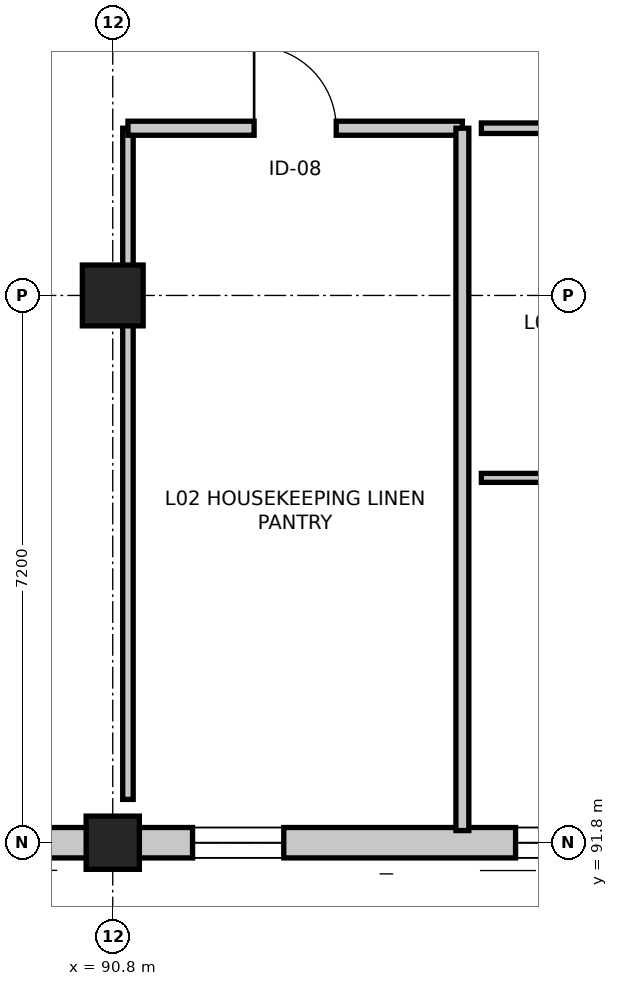
"""IFC4 building model, lengths in metres.
Left out: names, types, materials, properties, quantities, classifications, styles, units other than length and angle.
Written with IfcOpenShell. Run it as: python <this file> out.ifc"""

import sys

from ifc_helpers import new_model, si_unit, direction, frame, frame_2d, origin, origin_2d, place, context, subcontext, project, spatial, rectangle, extrude, element, fill, save


model = new_model("IFC4")
c1 = context("Model", 3, precision=1e-05, world=origin(), true_north=direction((0.0, 1.0)))
c2 = subcontext(c1, "Body", "Model", "MODEL_VIEW")
j1 = project(units=[si_unit("LENGTHUNIT", "METRE"), si_unit("PLANEANGLEUNIT", "RADIAN")], contexts=[c1])
p1 = place(None, origin())
s1 = spatial("IfcSite", under=j1, at=p1, CompositionType="ELEMENT")
p2 = place(p1, origin())
s2 = spatial("IfcBuilding", under=s1, at=p2, CompositionType="ELEMENT")
p3 = place(p2, frame((0.0, 0.0, 10.5)))
s3 = spatial("IfcBuildingStorey", under=s2, at=p3, CompositionType="ELEMENT", Elevation=10.5)
p4 = place(p3, frame((90.8, 91.8, 0.0), z_axis=(0.0, 0.0, 1.0), x_axis=(1.0, 0.0, 0.0)))
e1 = element("IfcColumn", 1, at=p4, inside=s3, PredefinedType="COLUMN", context=c2, shape_type="SweptSolid", body=[
    extrude(rectangle(XDim=0.7, YDim=0.7, at=origin_2d()), origin(), (0.0, 0.0, 1.0), 4.5),
])
p5 = place(p3, frame((90.8, 99.0, 0.0), z_axis=(0.0, 0.0, 1.0), x_axis=(1.0, 0.0, 0.0)))
e2 = element("IfcColumn", 2, at=p5, inside=s3, PredefinedType="COLUMN", context=c2, shape_type="SweptSolid", body=[
    extrude(rectangle(XDim=0.8, YDim=0.8, at=origin_2d()), origin(), (0.0, 0.0, 1.0), 4.5),
])
p6 = place(p3, frame((98.0, 91.8, 0.0), z_axis=(0.0, 0.0, 1.0), x_axis=(-1.0, 0.0, 0.0)))
e3 = element("IfcWall", 3, at=p6, inside=s3, PredefinedType="STANDARD", context=c2, shape_type="SweptSolid", body=[
    extrude(rectangle(XDim=7.2, YDim=0.4, at=frame_2d((3.6, 0.0))), origin(), (0.0, 0.0, 1.0), 3.455),
])
p7 = place(p6, frame((0.7, 0.0, 0.9)))
e4 = element("IfcOpeningElement", 4, at=p7, cuts=e3, PredefinedType="OPENING", context=c2, shape_type="SweptSolid", body=[
    extrude(rectangle(XDim=1.2, YDim=1.8, at=frame_2d((0.6, 0.9))), frame((0.0, 0.21, 0.0), z_axis=(0.0, -1.0, 0.0), x_axis=(1.0, 0.0, 0.0)), (0.0, 0.0, 1.0), 0.42),
])
p8 = place(p6, frame((4.95, 0.0, 0.85)))
e5 = element("IfcOpeningElement", 5, at=p8, cuts=e3, PredefinedType="OPENING", context=c2, shape_type="SweptSolid", body=[
    extrude(rectangle(XDim=1.2, YDim=1.8, at=frame_2d((0.6, 0.9))), frame((0.0, 0.21, 0.0), z_axis=(0.0, -1.0, 0.0), x_axis=(1.0, 0.0, 0.0)), (0.0, 0.0, 1.0), 0.42),
])
p9 = place(p3, frame((90.8, 91.8, 0.0), z_axis=(0.0, 0.0, 1.0), x_axis=(-1.0, 0.0, 0.0)))
e6 = element("IfcWall", 6, at=p9, inside=s3, PredefinedType="STANDARD", context=c2, shape_type="SweptSolid", body=[
    extrude(rectangle(XDim=7.2, YDim=0.4, at=frame_2d((3.6, 0.0))), origin(), (0.0, 0.0, 1.0), 3.455),
])
p10 = place(p9, frame((2.525, 0.0, 0.9)))
e7 = element("IfcOpeningElement", 7, at=p10, cuts=e6, PredefinedType="OPENING", context=c2, shape_type="SweptSolid", body=[
    extrude(rectangle(XDim=2.15, YDim=2.2, at=frame_2d((1.075, 1.1))), frame((0.0, 0.21, 0.0), z_axis=(0.0, -1.0, 0.0), x_axis=(1.0, 0.0, 0.0)), (0.0, 0.0, 1.0), 0.42),
])
p11 = place(p9, frame((4.95, 0.0, 0.85)))
e8 = element("IfcOpeningElement", 8, at=p11, cuts=e6, PredefinedType="OPENING", context=c2, shape_type="SweptSolid", body=[
    extrude(rectangle(XDim=1.2, YDim=1.8, at=frame_2d((0.6, 0.9))), frame((0.0, 0.21, 0.0), z_axis=(0.0, -1.0, 0.0), x_axis=(1.0, 0.0, 0.0)), (0.0, 0.0, 1.0), 0.42),
])
p12 = place(p3, frame((91.0, 92.37, 0.0), z_axis=(0.0, 0.0, 1.0), x_axis=(0.0, 1.0, 0.0)))
e9 = element("IfcWall", 9, at=p12, inside=s3, PredefinedType="PARTITIONING", context=c2, shape_type="SweptSolid", body=[
    extrude(rectangle(XDim=8.83, YDim=0.138, at=frame_2d((4.415, 0.0))), origin(), (0.0, 0.0, 1.0), 3.555),
])
p13 = place(p3, frame((91.0, 101.2, 0.0), z_axis=(0.0, 0.0, 1.0), x_axis=(1.0, 0.0, 0.0)))
e10 = element("IfcWall", 10, at=p13, inside=s3, PredefinedType="PARTITIONING", context=c2, shape_type="SweptSolid", body=[
    extrude(rectangle(XDim=4.4, YDim=0.185, at=frame_2d((2.2, 0.0))), origin(), (0.0, 0.0, 1.0), 3.555),
])
p14 = place(p13, frame((1.66, 0.0, 0.0)))
e11 = element("IfcOpeningElement", 11, at=p14, cuts=e10, PredefinedType="OPENING", context=c2, shape_type="SweptSolid", body=[
    extrude(rectangle(XDim=1.08, YDim=2.15, at=frame_2d((0.54, 1.075))), frame((0.0, 0.103, 0.0), z_axis=(0.0, -1.0, 0.0), x_axis=(1.0, 0.0, 0.0)), (0.0, 0.0, 1.0), 0.205),
])
p15 = place(p3, frame((95.4, 101.2, 0.0), z_axis=(0.0, 0.0, 1.0), x_axis=(0.0, -1.0, 0.0)))
e12 = element("IfcWall", 12, at=p15, inside=s3, PredefinedType="PARTITIONING", context=c2, shape_type="SweptSolid", body=[
    extrude(rectangle(XDim=9.24, YDim=0.17, at=frame_2d((4.62, 0.0))), origin(), (0.0, 0.0, 1.0), 3.455),
])
p16 = place(p3, frame((95.65, 101.2, 0.0), z_axis=(0.0, 0.0, 1.0), x_axis=(1.0, 0.0, 0.0)))
e13 = element("IfcWall", 13, at=p16, inside=s3, PredefinedType="PARTITIONING", context=c2, shape_type="SweptSolid", body=[
    extrude(rectangle(XDim=3.25, YDim=0.138, at=frame_2d((1.625, 0.0))), origin(), (0.0, 0.0, 1.0), 3.555),
])
p17 = place(p16, frame((1.05, 0.0, 0.0)))
e14 = element("IfcOpeningElement", 14, at=p17, cuts=e13, PredefinedType="OPENING", context=c2, shape_type="SweptSolid", body=[
    extrude(rectangle(XDim=1.15, YDim=2.15, at=frame_2d((0.575, 1.075))), frame((0.0, 0.079, 0.0), z_axis=(0.0, -1.0, 0.0), x_axis=(1.0, 0.0, 0.0)), (0.0, 0.0, 1.0), 0.158),
])
p18 = place(p3, frame((98.9, 96.6, 0.0), z_axis=(0.0, 0.0, 1.0), x_axis=(-1.0, 0.0, 0.0)))
e15 = element("IfcWall", 15, at=p18, inside=s3, PredefinedType="PARTITIONING", context=c2, shape_type="SweptSolid", body=[
    extrude(rectangle(XDim=3.25, YDim=0.118, at=frame_2d((1.625, 0.0))), origin(), (0.0, 0.0, 1.0), 3.555),
])
p19 = place(p7, origin())
e16 = element("IfcWindow", 16, at=p19, inside=s3, PartitioningType="SINGLE_PANEL", PredefinedType="WINDOW", context=c2, shape_type="SweptSolid", body=[
    extrude(rectangle(XDim=1.2, YDim=1.8, at=frame_2d((0.6, 0.9))), frame((0.0, 0.03, 0.0), z_axis=(0.0, -1.0, 0.0), x_axis=(1.0, 0.0, 0.0)), (0.0, 0.0, 1.0), 0.06),
])
fill(e4, e16)
p20 = place(p8, origin())
e17 = element("IfcWindow", 17, at=p20, inside=s3, PartitioningType="SINGLE_PANEL", PredefinedType="WINDOW", context=c2, shape_type="SweptSolid", body=[
    extrude(rectangle(XDim=1.2, YDim=1.8, at=frame_2d((0.6, 0.9))), frame((0.0, 0.03, 0.0), z_axis=(0.0, -1.0, 0.0), x_axis=(1.0, 0.0, 0.0)), (0.0, 0.0, 1.0), 0.06),
])
fill(e5, e17)
p21 = place(p14, origin())
e18 = element("IfcDoor", 18, at=p21, inside=s3, OperationType="SINGLE_SWING_LEFT", PredefinedType="DOOR", context=c2, shape_type="SweptSolid", body=[
    extrude(rectangle(XDim=1.08, YDim=2.15, at=frame_2d((0.54, 1.075))), frame((0.0, 0.025, 0.0), z_axis=(0.0, -1.0, 0.0), x_axis=(1.0, 0.0, 0.0)), (0.0, 0.0, 1.0), 0.05),
])
fill(e11, e18)
save(model, sys.argv[1])
